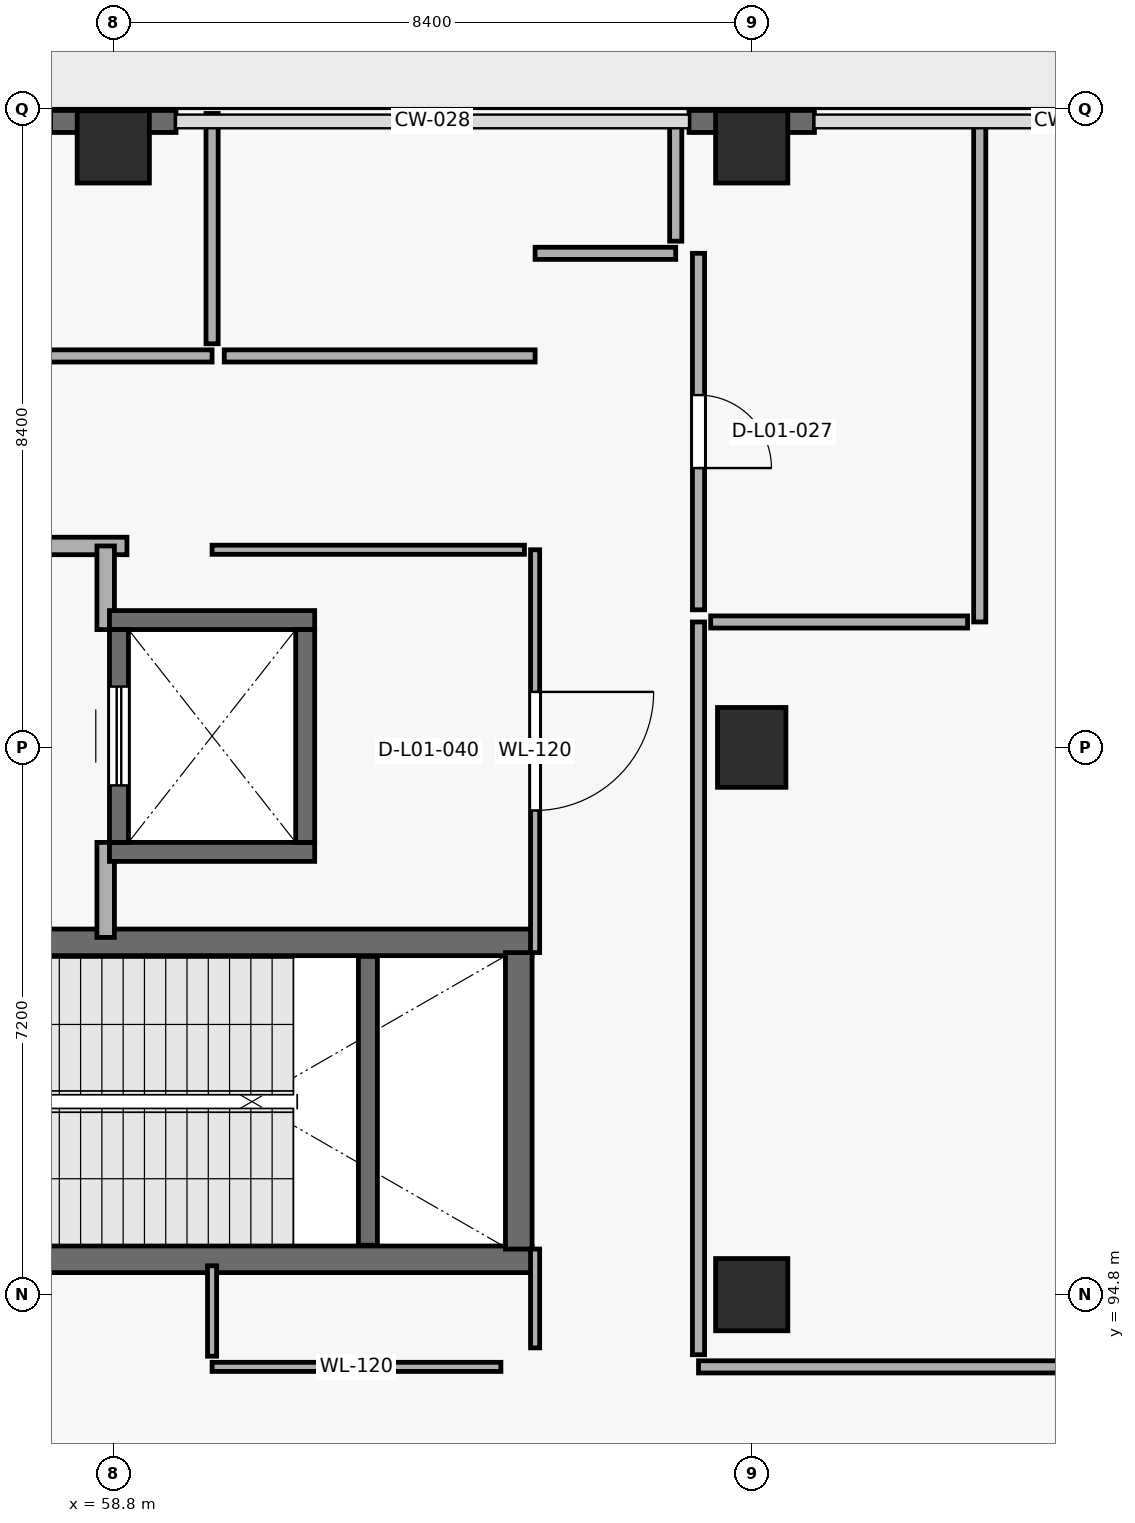
"""IFC4 building model, lengths in metres.
Left out: names, types, materials, properties, quantities, classifications, styles, units other than length and angle.
Written with IfcOpenShell. Run it as: python <this file> out.ifc"""

import sys

from ifc_helpers import new_model, si_unit, direction, frame, frame_2d, origin, origin_2d, place, context, subcontext, project, spatial, rectangle, extrude, element, fill, save


model = new_model("IFC4")
c1 = context("Model", 3, precision=1e-05, world=origin(), true_north=direction((0.0, 1.0)))
c2 = subcontext(c1, "Body", "Model", "MODEL_VIEW")
j1 = project(units=[si_unit("LENGTHUNIT", "METRE"), si_unit("PLANEANGLEUNIT", "RADIAN")], contexts=[c1])
p1 = place(None, origin())
s1 = spatial("IfcSite", under=j1, at=p1, CompositionType="ELEMENT")
p2 = place(p1, origin())
s2 = spatial("IfcBuilding", under=s1, at=p2, CompositionType="ELEMENT")
p3 = place(p2, origin())
s3 = spatial("IfcBuildingStorey", under=s2, at=p3, CompositionType="ELEMENT", Elevation=0.0)
for number, where, z_axis, x_axis in (
    (1, (58.8, 109.9, 0.0), (0.0, 0.0, 1.0), (1.0, 0.0, 0.0)),
    (2, (67.2, 94.8, 0.0), (0.0, 0.0, 1.0), (1.0, 0.0, 0.0)),
):
    element("IfcColumn", number, at=place(p3, frame(where, z_axis=z_axis, x_axis=x_axis)), inside=s3, PredefinedType="COLUMN", context=c2, shape_type="SweptSolid", body=[
        extrude(rectangle(XDim=0.95, YDim=0.95, at=origin_2d()), origin(), (0.0, 0.0, 1.0), 5.4),
    ])
p4 = place(p3, frame((67.2, 102.0, 0.0), z_axis=(0.0, 0.0, 1.0), x_axis=(1.0, 0.0, 0.0)))
e3 = element("IfcColumn", 3, at=p4, inside=s3, PredefinedType="COLUMN", context=c2, shape_type="SweptSolid", body=[
    extrude(rectangle(XDim=0.9, YDim=1.05, at=origin_2d()), origin(), (0.0, 0.0, 1.0), 5.4),
])
p5 = place(p3, frame((67.2, 109.9, 0.0), z_axis=(0.0, 0.0, 1.0), x_axis=(1.0, 0.0, 0.0)))
e4 = element("IfcColumn", 4, at=p5, inside=s3, PredefinedType="COLUMN", context=c2, shape_type="SweptSolid", body=[
    extrude(rectangle(XDim=0.95, YDim=0.95, at=origin_2d()), origin(), (0.0, 0.0, 1.0), 5.4),
])
for number, where, z_axis, x_axis in (
    (5, (57.975, 110.235, 0.0), (0.0, 0.0, 1.0), (1.0, 0.0, 0.0)),
    (6, (66.375, 110.235, 0.0), (0.0, 0.0, 1.0), (1.0, 0.0, 0.0)),
):
    element("IfcWall", number, at=place(p3, frame(where, z_axis=z_axis, x_axis=x_axis)), inside=s3, PredefinedType="SOLIDWALL", context=c2, shape_type="SweptSolid", body=[
        extrude(rectangle(XDim=1.65, YDim=0.29, at=frame_2d((0.825, 0.0))), origin(), (0.0, 0.0, 1.0), 5.12),
    ])
p6 = place(p3, frame((55.09, 95.265, 0.0), z_axis=(0.0, 0.0, 1.0), x_axis=(1.0, 0.0, 0.0)))
e7 = element("IfcWall", 7, at=p6, inside=s3, PredefinedType="SHEAR", context=c2, shape_type="SweptSolid", body=[
    extrude(rectangle(XDim=9.22, YDim=0.35, at=frame_2d((4.61, 0.0))), origin(), (0.0, 0.0, 1.0), 5.12),
])
p7 = place(p6, frame((0.45, 0.0, 0.0)))
e8 = element("IfcOpeningElement", 8, at=p7, cuts=e7, PredefinedType="OPENING", context=c2, shape_type="SweptSolid", body=[
    extrude(rectangle(XDim=1.25, YDim=2.2, at=frame_2d((0.625, 1.1))), frame((0.0, 0.185, 0.0), z_axis=(0.0, -1.0, 0.0), x_axis=(1.0, 0.0, 0.0)), (0.0, 0.0, 1.0), 0.37),
])
p8 = place(p3, frame((64.31, 99.435, 0.0), z_axis=(0.0, 0.0, 1.0), x_axis=(-1.0, 0.0, 0.0)))
e9 = element("IfcWall", 9, at=p8, inside=s3, PredefinedType="SHEAR", context=c2, shape_type="SweptSolid", body=[
    extrude(rectangle(XDim=9.22, YDim=0.35, at=frame_2d((4.61, 0.0))), origin(), (0.0, 0.0, 1.0), 5.12),
])
p9 = place(p8, frame((7.72, 0.0, 0.0)))
e10 = element("IfcOpeningElement", 10, at=p9, cuts=e9, PredefinedType="OPENING", context=c2, shape_type="SweptSolid", body=[
    extrude(rectangle(XDim=1.2, YDim=2.2, at=frame_2d((0.6, 1.1))), frame((0.0, 0.185, 0.0), z_axis=(0.0, -1.0, 0.0), x_axis=(1.0, 0.0, 0.0)), (0.0, 0.0, 1.0), 0.37),
])
p10 = place(p3, frame((64.135, 99.3, 0.0), z_axis=(0.0, 0.0, 1.0), x_axis=(0.0, -1.0, 0.0)))
e11 = element("IfcWall", 11, at=p10, inside=s3, PredefinedType="SHEAR", context=c2, shape_type="SweptSolid", body=[
    extrude(rectangle(XDim=3.9, YDim=0.35, at=frame_2d((1.95, 0.0))), origin(), (0.0, 0.0, 1.0), 5.12),
])
p11 = place(p3, frame((62.15, 95.45, 0.0), z_axis=(0.0, 0.0, 1.0), x_axis=(0.0, 1.0, 0.0)))
e12 = element("IfcWall", 12, at=p11, inside=s3, PredefinedType="SHEAR", context=c2, shape_type="SweptSolid", body=[
    extrude(rectangle(XDim=3.8, YDim=0.25, at=frame_2d((1.9, 0.0))), origin(), (0.0, 0.0, 1.0), 2.52),
])
p12 = place(p3, frame((55.09, 104.65, 0.0), z_axis=(0.0, 0.0, 1.0), x_axis=(1.0, 0.0, 0.0)))
e13 = element("IfcWall", 13, at=p12, inside=s3, PredefinedType="PARTITIONING", context=c2, shape_type="SweptSolid", body=[
    extrude(rectangle(XDim=3.89, YDim=0.23, at=frame_2d((1.945, 0.0))), origin(), (0.0, 0.0, 1.0), 5.12),
])
p13 = place(p12, frame((1.15, 0.0, 0.0)))
e14 = element("IfcOpeningElement", 14, at=p13, cuts=e13, PredefinedType="OPENING", context=c2, shape_type="SweptSolid", body=[
    extrude(rectangle(XDim=1.2, YDim=2.2, at=frame_2d((0.6, 1.1))), frame((0.0, 0.125, 0.0), z_axis=(0.0, -1.0, 0.0), x_axis=(1.0, 0.0, 0.0)), (0.0, 0.0, 1.0), 0.25),
])
p14 = place(p3, frame((58.7, 104.65, 0.0), z_axis=(0.0, 0.0, 1.0), x_axis=(0.0, -1.0, 0.0)))
e15 = element("IfcWall", 15, at=p14, inside=s3, PredefinedType="PARTITIONING", context=c2, shape_type="SweptSolid", body=[
    extrude(rectangle(XDim=1.1, YDim=0.23, at=frame_2d((0.55, 0.0))), origin(), (0.0, 0.0, 1.0), 5.12),
])
p15 = place(p3, frame((58.7, 100.75, 0.0), z_axis=(0.0, 0.0, 1.0), x_axis=(0.0, -1.0, 0.0)))
e16 = element("IfcWall", 16, at=p15, inside=s3, PredefinedType="PARTITIONING", context=c2, shape_type="SweptSolid", body=[
    extrude(rectangle(XDim=1.25, YDim=0.23, at=frame_2d((0.625, 0.0))), origin(), (0.0, 0.0, 1.0), 5.12),
])
for number, where, z_axis, x_axis in (
    (17, (58.75, 100.625, 0.0), (0.0, 0.0, 1.0), (1.0, 0.0, 0.0)),
    (18, (61.45, 103.675, 0.0), (0.0, 0.0, 1.0), (-1.0, 0.0, 0.0)),
):
    element("IfcWall", number, at=place(p3, frame(where, z_axis=z_axis, x_axis=x_axis)), inside=s3, PredefinedType="SHEAR", context=c2, shape_type="SweptSolid", body=[
        extrude(rectangle(XDim=2.7, YDim=0.25, at=frame_2d((1.35, 0.0))), origin(), (0.0, 0.0, 1.0), 5.12),
    ])
p16 = place(p3, frame((58.875, 100.75, 0.0), z_axis=(0.0, 0.0, 1.0), x_axis=(0.0, 1.0, 0.0)))
e19 = element("IfcWall", 19, at=p16, inside=s3, PredefinedType="SHEAR", context=c2, shape_type="SweptSolid", body=[
    extrude(rectangle(XDim=2.8, YDim=0.25, at=frame_2d((1.4, 0.0))), origin(), (0.0, 0.0, 1.0), 5.12),
])
p17 = place(p16, frame((0.75, 0.0, 0.0)))
e20 = element("IfcOpeningElement", 20, at=p17, cuts=e19, PredefinedType="OPENING", context=c2, shape_type="SweptSolid", body=[
    extrude(rectangle(XDim=1.3, YDim=2.25, at=frame_2d((0.65, 1.125))), frame((0.0, 0.135, 0.0), z_axis=(0.0, -1.0, 0.0), x_axis=(1.0, 0.0, 0.0)), (0.0, 0.0, 1.0), 0.27),
])
p18 = place(p3, frame((61.325, 103.55, 0.0), z_axis=(0.0, 0.0, 1.0), x_axis=(0.0, -1.0, 0.0)))
e21 = element("IfcWall", 21, at=p18, inside=s3, PredefinedType="SHEAR", context=c2, shape_type="SweptSolid", body=[
    extrude(rectangle(XDim=2.8, YDim=0.25, at=frame_2d((1.4, 0.0))), origin(), (0.0, 0.0, 1.0), 5.12),
])
p19 = place(p3, frame((80.8, 93.85, 0.0), z_axis=(0.0, 0.0, 1.0), x_axis=(-1.0, 0.0, 0.0)))
e22 = element("IfcWall", 22, at=p19, inside=s3, PredefinedType="PARTITIONING", context=c2, shape_type="SweptSolid", body=[
    extrude(rectangle(XDim=14.3, YDim=0.16, at=frame_2d((7.15, 0.0))), origin(), (0.0, 0.0, 1.0), 5.12),
])
p20 = place(p3, frame((64.35, 104.6, 0.0), z_axis=(0.0, 0.0, 1.0), x_axis=(0.0, -1.0, 0.0)))
e23 = element("IfcWall", 23, at=p20, inside=s3, PredefinedType="PARTITIONING", context=c2, shape_type="SweptSolid", body=[
    extrude(rectangle(XDim=5.3, YDim=0.12, at=frame_2d((2.65, 0.0))), origin(), (0.0, 0.0, 1.0), 5.12),
])
p21 = place(p20, frame((1.87, 0.0, 0.0)))
e24 = element("IfcOpeningElement", 24, at=p21, cuts=e23, PredefinedType="OPENING", context=c2, shape_type="SweptSolid", body=[
    extrude(rectangle(XDim=1.56, YDim=2.44, at=frame_2d((0.78, 1.22))), frame((0.0, 0.07, 0.0), z_axis=(0.0, -1.0, 0.0), x_axis=(1.0, 0.0, 0.0)), (0.0, 0.0, 1.0), 0.14),
])
p22 = place(p3, frame((64.35, 95.4, 0.0), z_axis=(0.0, 0.0, 1.0), x_axis=(0.0, -1.0, 0.0)))
e25 = element("IfcWall", 25, at=p22, inside=s3, PredefinedType="PARTITIONING", context=c2, shape_type="SweptSolid", body=[
    extrude(rectangle(XDim=1.3, YDim=0.12, at=frame_2d((0.65, 0.0))), origin(), (0.0, 0.0, 1.0), 5.12),
])
p23 = place(p3, frame((66.5, 94.01, 0.0), z_axis=(0.0, 0.0, 1.0), x_axis=(0.0, 1.0, 0.0)))
e26 = element("IfcWall", 26, at=p23, inside=s3, PredefinedType="PARTITIONING", context=c2, shape_type="SweptSolid", body=[
    extrude(rectangle(XDim=9.64, YDim=0.16, at=frame_2d((4.82, 0.0))), origin(), (0.0, 0.0, 1.0), 5.12),
])
p24 = place(p3, frame((60.1, 107.15, 0.0), z_axis=(0.0, 0.0, 1.0), x_axis=(-1.0, 0.0, 0.0)))
e27 = element("IfcWall", 27, at=p24, inside=s3, PredefinedType="PARTITIONING", context=c2, shape_type="SweptSolid", body=[
    extrude(rectangle(XDim=7.5, YDim=0.16, at=frame_2d((3.75, 0.0))), origin(), (0.0, 0.0, 1.0), 5.12),
])
p25 = place(p3, frame((70.2, 110.25, 0.0), z_axis=(0.0, 0.0, 1.0), x_axis=(0.0, -1.0, 0.0)))
e28 = element("IfcWall", 28, at=p25, inside=s3, PredefinedType="PARTITIONING", context=c2, shape_type="SweptSolid", body=[
    extrude(rectangle(XDim=6.6, YDim=0.16, at=frame_2d((3.3, 0.0))), origin(), (0.0, 0.0, 1.0), 5.12),
])
p26 = place(p3, frame((66.5, 103.81, 0.0), z_axis=(0.0, 0.0, 1.0), x_axis=(0.0, 1.0, 0.0)))
e29 = element("IfcWall", 29, at=p26, inside=s3, PredefinedType="PARTITIONING", context=c2, shape_type="SweptSolid", body=[
    extrude(rectangle(XDim=4.69, YDim=0.16, at=frame_2d((2.345, 0.0))), origin(), (0.0, 0.0, 1.0), 5.12),
])
p27 = place(p26, frame((1.865, 0.0, 0.0)))
e30 = element("IfcOpeningElement", 30, at=p27, cuts=e29, PredefinedType="OPENING", context=c2, shape_type="SweptSolid", body=[
    extrude(rectangle(XDim=0.96, YDim=2.14, at=frame_2d((0.48, 1.07))), frame((0.0, 0.09, 0.0), z_axis=(0.0, -1.0, 0.0), x_axis=(1.0, 0.0, 0.0)), (0.0, 0.0, 1.0), 0.18),
])
p28 = place(p3, frame((64.35, 107.15, 0.0), z_axis=(0.0, 0.0, 1.0), x_axis=(-1.0, 0.0, 0.0)))
e31 = element("IfcWall", 31, at=p28, inside=s3, PredefinedType="PARTITIONING", context=c2, shape_type="SweptSolid", body=[
    extrude(rectangle(XDim=4.09, YDim=0.16, at=frame_2d((2.045, 0.0))), origin(), (0.0, 0.0, 1.0), 5.12),
])
p29 = place(p3, frame((60.1, 104.6, 0.0), z_axis=(0.0, 0.0, 1.0), x_axis=(1.0, 0.0, 0.0)))
e32 = element("IfcWall", 32, at=p29, inside=s3, PredefinedType="PARTITIONING", context=c2, shape_type="SweptSolid", body=[
    extrude(rectangle(XDim=4.11, YDim=0.12, at=frame_2d((2.055, 0.0))), origin(), (0.0, 0.0, 1.0), 5.12),
])
p30 = place(p3, frame((63.9, 93.85, 0.0), z_axis=(0.0, 0.0, 1.0), x_axis=(-1.0, 0.0, 0.0)))
e33 = element("IfcWall", 33, at=p30, inside=s3, PredefinedType="PARTITIONING", context=c2, shape_type="SweptSolid", body=[
    extrude(rectangle(XDim=3.8, YDim=0.12, at=frame_2d((1.9, 0.0))), origin(), (0.0, 0.0, 1.0), 5.12),
])
p31 = place(p3, frame((70.04, 103.65, 0.0), z_axis=(0.0, 0.0, 1.0), x_axis=(-1.0, 0.0, 0.0)))
e34 = element("IfcWall", 34, at=p31, inside=s3, PredefinedType="PARTITIONING", context=c2, shape_type="SweptSolid", body=[
    extrude(rectangle(XDim=3.38, YDim=0.16, at=frame_2d((1.69, 0.0))), origin(), (0.0, 0.0, 1.0), 5.12),
])
p32 = place(p3, frame((60.1, 110.34, 0.0), z_axis=(0.0, 0.0, 1.0), x_axis=(0.0, -1.0, 0.0)))
e35 = element("IfcWall", 35, at=p32, inside=s3, PredefinedType="PARTITIONING", context=c2, shape_type="SweptSolid", body=[
    extrude(rectangle(XDim=3.03, YDim=0.16, at=frame_2d((1.515, 0.0))), origin(), (0.0, 0.0, 1.0), 5.12),
])
p33 = place(p3, frame((66.2, 108.5, 0.0), z_axis=(0.0, 0.0, 1.0), x_axis=(-1.0, 0.0, 0.0)))
e36 = element("IfcWall", 36, at=p33, inside=s3, PredefinedType="PARTITIONING", context=c2, shape_type="SweptSolid", body=[
    extrude(rectangle(XDim=1.85, YDim=0.16, at=frame_2d((0.925, 0.0))), origin(), (0.0, 0.0, 1.0), 5.12),
])
p34 = place(p3, frame((66.2, 108.66, 0.0), z_axis=(0.0, 0.0, 1.0), x_axis=(0.0, 1.0, 0.0)))
e37 = element("IfcWall", 37, at=p34, inside=s3, PredefinedType="PARTITIONING", context=c2, shape_type="SweptSolid", body=[
    extrude(rectangle(XDim=1.59, YDim=0.16, at=frame_2d((0.795, 0.0))), origin(), (0.0, 0.0, 1.0), 5.12),
])
p35 = place(p3, frame((60.1, 93.99, 0.0), z_axis=(0.0, 0.0, 1.0), x_axis=(0.0, 1.0, 0.0)))
e38 = element("IfcWall", 38, at=p35, inside=s3, PredefinedType="PARTITIONING", context=c2, shape_type="SweptSolid", body=[
    extrude(rectangle(XDim=1.19, YDim=0.12, at=frame_2d((0.595, 0.0))), origin(), (0.0, 0.0, 1.0), 5.12),
])
p36 = place(p17, origin())
e39 = element("IfcDoor", 39, at=p36, inside=s3, OperationType="SLIDING_TO_RIGHT", PredefinedType="DOOR", context=c2, shape_type="SweptSolid", body=[
    extrude(rectangle(XDim=1.3, YDim=2.25, at=frame_2d((0.65, 1.125))), frame((0.0, 0.025, 0.0), z_axis=(0.0, -1.0, 0.0), x_axis=(1.0, 0.0, 0.0)), (0.0, 0.0, 1.0), 0.05),
])
fill(e20, e39)
p37 = place(p27, origin())
e40 = element("IfcDoor", 40, at=p37, inside=s3, OperationType="SINGLE_SWING_RIGHT", PredefinedType="DOOR", context=c2, shape_type="SweptSolid", body=[
    extrude(rectangle(XDim=0.96, YDim=2.14, at=frame_2d((0.48, 1.07))), frame((0.0, 0.025, 0.0), z_axis=(0.0, -1.0, 0.0), x_axis=(1.0, 0.0, 0.0)), (0.0, 0.0, 1.0), 0.05),
])
fill(e30, e40)
p38 = place(p21, origin())
e41 = element("IfcDoor", 41, at=p38, inside=s3, OperationType="SINGLE_SWING_LEFT", PredefinedType="DOOR", context=c2, shape_type="SweptSolid", body=[
    extrude(rectangle(XDim=1.56, YDim=2.44, at=frame_2d((0.78, 1.22))), frame((0.0, 0.025, 0.0), z_axis=(0.0, -1.0, 0.0), x_axis=(1.0, 0.0, 0.0)), (0.0, 0.0, 1.0), 0.05),
])
fill(e24, e41)
save(model, sys.argv[1])
